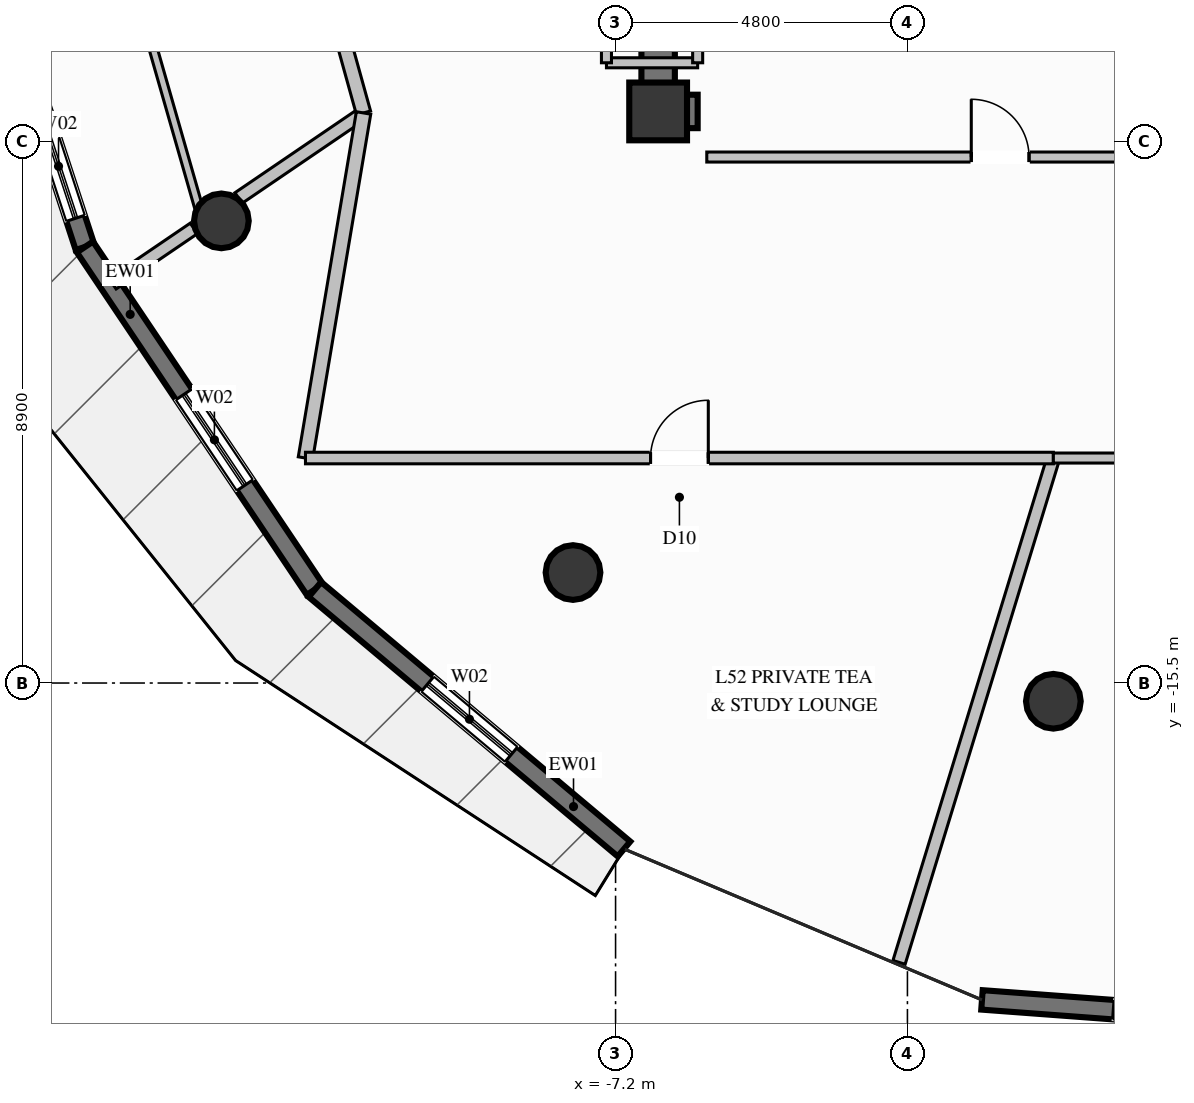
"""IFC4 building model, lengths in metres.
Left out: names, types, materials, properties, quantities, classifications, styles, units other than length and angle.
Written with IfcOpenShell. Run it as: python <this file> out.ifc"""

import sys

from ifc_helpers import new_model, si_unit, direction, frame, frame_2d, origin, origin_2d, place, context, subcontext, project, spatial, rectangle, circle, extrude, element, fill, save


model = new_model("IFC4")
c1 = context("Model", 3, precision=1e-05, world=origin(), true_north=direction((0.0, 1.0)))
c2 = subcontext(c1, "Body", "Model", "MODEL_VIEW")
j1 = project(units=[si_unit("LENGTHUNIT", "METRE"), si_unit("PLANEANGLEUNIT", "RADIAN")], contexts=[c1])
p1 = place(None, origin())
s1 = spatial("IfcSite", under=j1, at=p1, CompositionType="ELEMENT")
p2 = place(p1, origin())
s2 = spatial("IfcBuilding", under=s1, at=p2, CompositionType="ELEMENT")
p3 = place(p2, frame((0.0, 0.0, 202.0)))
s3 = spatial("IfcBuildingStorey", under=s2, at=p3, CompositionType="ELEMENT", Elevation=202.0)
p4 = place(p3, frame((-6.5, -6.1, 0.0), z_axis=(0.0, 0.0, 1.0), x_axis=(1.0, 0.0, 0.0)))
e1 = element("IfcColumn", 1, at=p4, inside=s3, PredefinedType="COLUMN", context=c2, shape_type="SweptSolid", body=[
    extrude(rectangle(XDim=0.95, YDim=0.95, at=origin_2d()), origin(), (0.0, 0.0, 1.0), 3.6),
])
p5 = place(p3, frame((-6.225, -6.1, 0.0), z_axis=(0.0, 0.0, 1.0), x_axis=(1.0, 0.0, 0.0)))
e2 = element("IfcWall", 2, at=p5, inside=s3, PredefinedType="SHEAR", context=c2, shape_type="SweptSolid", body=[
    extrude(rectangle(XDim=0.375, YDim=0.55, at=frame_2d((0.188, 0.0))), origin(), (0.0, 0.0, 1.0), 3.6),
])
p6 = place(p3, frame((-6.5, -6.375, 0.0), z_axis=(0.0, 0.0, 1.0), x_axis=(0.0, 1.0, 0.0)))
e3 = element("IfcWall", 3, at=p6, inside=s3, PredefinedType="SHEAR", context=c2, shape_type="SweptSolid", body=[
    extrude(rectangle(XDim=3.025, YDim=0.55, at=frame_2d((1.512, 0.0))), origin(), (0.0, 0.0, 1.0), 3.6),
])
for number, where, z_axis, x_axis in (
    (4, (-13.683, -7.9, 0.0), (0.0, 0.0, 1.0), (1.0, 0.0, 0.0)),
    (5, (-7.9, -13.683, 0.0), (0.0, 0.0, 1.0), (1.0, 0.0, 0.0)),
    (6, (0.0, -15.8, 0.0), (0.0, 0.0, 1.0), (1.0, 0.0, 0.0)),
):
    element("IfcColumn", number, at=place(p3, frame(where, z_axis=z_axis, x_axis=x_axis)), inside=s3, PredefinedType="COLUMN", context=c2, shape_type="SweptSolid", body=[
        extrude(circle(Radius=0.45, at=origin_2d()), origin(), (0.0, 0.0, 1.0), 3.6),
    ])
p7 = place(p3, frame((-15.927, -8.329, 0.0), z_axis=(0.0, 0.0, 1.0), x_axis=(-0.311096372271, 0.950378370524, 0.0)))
e7 = element("IfcWall", 7, at=p7, inside=s3, PredefinedType="SOLIDWALL", context=c2, shape_type="SweptSolid", body=[
    extrude(rectangle(XDim=6.786, YDim=0.32, at=frame_2d((3.393, 0.0))), origin(), (0.0, 0.0, 1.0), 3.36),
])
p8 = place(p7, frame((0.496, 0.0, 0.35)))
e8 = element("IfcOpeningElement", 8, at=p8, cuts=e7, PredefinedType="OPENING", context=c2, shape_type="SweptSolid", body=[
    extrude(rectangle(XDim=1.8, YDim=2.6, at=frame_2d((0.9, 1.3))), frame((0.0, 0.17, 0.0), z_axis=(0.0, -1.0, 0.0), x_axis=(1.0, 0.0, 0.0)), (0.0, 0.0, 1.0), 0.34),
])
p9 = place(p7, frame((2.843, 0.0, 0.0)))
e9 = element("IfcOpeningElement", 9, at=p9, cuts=e7, PredefinedType="OPENING", context=c2, shape_type="SweptSolid", body=[
    extrude(rectangle(XDim=1.1, YDim=2.2, at=frame_2d((0.55, 1.1))), frame((0.0, 0.17, 0.0), z_axis=(0.0, -1.0, 0.0), x_axis=(1.0, 0.0, 0.0)), (0.0, 0.0, 1.0), 0.34),
])
p10 = place(p3, frame((-12.145, -13.962, 0.0), z_axis=(0.0, 0.0, 1.0), x_axis=(-0.557429227347, 0.830224461516, 0.0)))
e10 = element("IfcWall", 10, at=p10, inside=s3, PredefinedType="SOLIDWALL", context=c2, shape_type="SweptSolid", body=[
    extrude(rectangle(XDim=6.785, YDim=0.32, at=frame_2d((3.392, 0.0))), origin(), (0.0, 0.0, 1.0), 3.36),
])
p11 = place(p10, frame((2.065, 0.0, 0.35)))
e11 = element("IfcOpeningElement", 11, at=p11, cuts=e10, PredefinedType="OPENING", context=c2, shape_type="SweptSolid", body=[
    extrude(rectangle(XDim=1.8, YDim=2.6, at=frame_2d((0.9, 1.3))), frame((0.0, 0.17, 0.0), z_axis=(0.0, -1.0, 0.0), x_axis=(1.0, 0.0, 0.0)), (0.0, 0.0, 1.0), 0.34),
])
p12 = place(p3, frame((-7.061, -18.229, 0.0), z_axis=(0.0, 0.0, 1.0), x_axis=(-0.765961316102, 0.642886663601, 0.0)))
e12 = element("IfcWall", 12, at=p12, inside=s3, PredefinedType="SOLIDWALL", context=c2, shape_type="SweptSolid", body=[
    extrude(rectangle(XDim=6.637, YDim=0.32, at=frame_2d((3.319, 0.0))), origin(), (0.0, 0.0, 1.0), 3.36),
])
p13 = place(p12, frame((2.419, 0.0, 0.35)))
e13 = element("IfcOpeningElement", 13, at=p13, cuts=e12, PredefinedType="OPENING", context=c2, shape_type="SweptSolid", body=[
    extrude(rectangle(XDim=1.8, YDim=2.6, at=frame_2d((0.9, 1.3))), frame((0.0, 0.17, 0.0), z_axis=(0.0, -1.0, 0.0), x_axis=(1.0, 0.0, 0.0)), (0.0, 0.0, 1.0), 0.34),
])
p14 = place(p3, frame((4.941, -21.166, 0.0), z_axis=(0.0, 0.0, 1.0), x_axis=(-0.997242274748, 0.074214860068, 0.0)))
e14 = element("IfcWall", 14, at=p14, inside=s3, PredefinedType="SOLIDWALL", context=c2, shape_type="SweptSolid", body=[
    extrude(rectangle(XDim=6.132, YDim=0.32, at=frame_2d((3.066, 0.0))), origin(), (0.0, 0.0, 1.0), 3.36),
])
p15 = place(p14, frame((2.166, 0.0, 0.35)))
e15 = element("IfcOpeningElement", 15, at=p15, cuts=e14, PredefinedType="OPENING", context=c2, shape_type="SweptSolid", body=[
    extrude(rectangle(XDim=1.8, YDim=2.6, at=frame_2d((0.9, 1.3))), frame((0.0, 0.17, 0.0), z_axis=(0.0, -1.0, 0.0), x_axis=(1.0, 0.0, 0.0)), (0.0, 0.0, 1.0), 0.34),
])
p16 = place(p3, frame((-7.35, -5.3, 0.0), z_axis=(0.0, 0.0, 1.0), x_axis=(1.0, 0.0, 0.0)))
e16 = element("IfcWall", 16, at=p16, inside=s3, PredefinedType="PARTITIONING", context=c2, shape_type="SweptSolid", body=[
    extrude(rectangle(XDim=1.5, YDim=0.165, at=frame_2d((0.75, 0.0))), origin(), (0.0, 0.0, 1.0), 2.445),
])
p17 = place(p3, frame((-5.85, -5.3, 0.0), z_axis=(0.0, 0.0, 1.0), x_axis=(0.0, 1.0, 0.0)))
e17 = element("IfcWall", 17, at=p17, inside=s3, PredefinedType="PARTITIONING", context=c2, shape_type="SweptSolid", body=[
    extrude(rectangle(XDim=2.5, YDim=0.165, at=frame_2d((1.25, 0.0))), origin(), (0.0, 0.0, 1.0), 2.445),
])
p18 = place(p3, frame((-7.35, -2.8, 0.0), z_axis=(0.0, 0.0, 1.0), x_axis=(0.0, -1.0, 0.0)))
e18 = element("IfcWall", 18, at=p18, inside=s3, PredefinedType="PARTITIONING", context=c2, shape_type="SweptSolid", body=[
    extrude(rectangle(XDim=2.5, YDim=0.165, at=frame_2d((1.25, 0.0))), origin(), (0.0, 0.0, 1.0), 3.36),
])
p19 = place(p18, frame((0.775, 0.0, 0.0)))
e19 = element("IfcOpeningElement", 19, at=p19, cuts=e18, PredefinedType="OPENING", context=c2, shape_type="SweptSolid", body=[
    extrude(rectangle(XDim=0.95, YDim=2.1, at=frame_2d((0.475, 1.05))), frame((0.0, 0.093, 0.0), z_axis=(0.0, -1.0, 0.0), x_axis=(1.0, 0.0, 0.0)), (0.0, 0.0, 1.0), 0.185),
])
p20 = place(p3, frame((-5.7, -6.85, 0.0), z_axis=(0.0, 0.0, 1.0), x_axis=(1.0, 0.0, 0.0)))
e20 = element("IfcWall", 20, at=p20, inside=s3, PredefinedType="PARTITIONING", context=c2, shape_type="SweptSolid", body=[
    extrude(rectangle(XDim=9.65, YDim=0.165, at=frame_2d((4.825, 0.0))), origin(), (0.0, 0.0, 1.0), 2.445),
])
p21 = place(p20, frame((4.35, 0.0, 0.0)))
e21 = element("IfcOpeningElement", 21, at=p21, cuts=e20, PredefinedType="OPENING", context=c2, shape_type="SweptSolid", body=[
    extrude(rectangle(XDim=0.95, YDim=2.1, at=frame_2d((0.475, 1.05))), frame((0.0, 0.093, 0.0), z_axis=(0.0, -1.0, 0.0), x_axis=(1.0, 0.0, 0.0)), (0.0, 0.0, 1.0), 0.185),
])
p22 = place(p3, frame((-11.345, -6.125, 0.0), z_axis=(0.0, 0.0, 1.0), x_axis=(-0.82675664011, -0.562559737303, 0.0)))
e22 = element("IfcWall", 22, at=p22, inside=s3, PredefinedType="PARTITIONING", context=c2, shape_type="SweptSolid", body=[
    extrude(rectangle(XDim=2.487, YDim=0.21, at=frame_2d((1.243, 0.0))), origin(), (0.0, 0.0, 1.0), 2.801),
])
p23 = place(p3, frame((-14.136, -8.024, 0.0), z_axis=(0.0, 0.0, 1.0), x_axis=(-0.826904032376, -0.562343063654, 0.0)))
e23 = element("IfcWall", 23, at=p23, inside=s3, PredefinedType="PARTITIONING", context=c2, shape_type="SweptSolid", body=[
    extrude(rectangle(XDim=1.617, YDim=0.21, at=frame_2d((0.808, 0.0))), origin(), (0.0, 0.0, 1.0), 3.36),
])
p24 = place(p3, frame((-13.1, 0.2, 0.0), z_axis=(0.0, 0.0, 1.0), x_axis=(0.26738871748, -0.963588747218, 0.0)))
e24 = element("IfcWall", 24, at=p24, inside=s3, PredefinedType="PARTITIONING", context=c2, shape_type="SweptSolid", body=[
    extrude(rectangle(XDim=6.564, YDim=0.24, at=frame_2d((3.282, 0.0))), origin(), (0.0, 0.0, 1.0), 3.36),
])
p25 = place(p3, frame((-16.277, 0.072, 0.0), z_axis=(0.0, 0.0, 1.0), x_axis=(0.275388011089, -0.961333159393, 0.0)))
e25 = element("IfcWall", 25, at=p25, inside=s3, PredefinedType="PARTITIONING", context=c2, shape_type="SweptSolid", body=[
    extrude(rectangle(XDim=8.316, YDim=0.135, at=frame_2d((4.158, 0.0))), origin(), (0.0, 0.0, 1.0), 2.929),
])
p26 = place(p25, frame((3.683, 0.0, 0.0)))
e26 = element("IfcOpeningElement", 26, at=p26, cuts=e25, PredefinedType="OPENING", context=c2, shape_type="SweptSolid", body=[
    extrude(rectangle(XDim=0.95, YDim=2.1, at=frame_2d((0.475, 1.05))), frame((0.0, 0.078, 0.0), z_axis=(0.0, -1.0, 0.0), x_axis=(1.0, 0.0, 0.0)), (0.0, 0.0, 1.0), 0.155),
])
p27 = place(p3, frame((0.0, -11.8, 0.0), z_axis=(0.0, 0.0, 1.0), x_axis=(-0.292621831888, -0.956228248643, 0.0)))
e27 = element("IfcWall", 27, at=p27, inside=s3, PredefinedType="PARTITIONING", context=c2, shape_type="SweptSolid", body=[
    extrude(rectangle(XDim=8.674, YDim=0.21, at=frame_2d((4.337, 0.0))), origin(), (0.0, 0.0, 1.0), 3.36),
])
p28 = place(p3, frame((-11.345, -6.125, 0.0), z_axis=(0.0, 0.0, 1.0), x_axis=(-0.165960421789, -0.986132414232, 0.0)))
e28 = element("IfcWall", 28, at=p28, inside=s3, PredefinedType="PARTITIONING", context=c2, shape_type="SweptSolid", body=[
    extrude(rectangle(XDim=5.755, YDim=0.24, at=frame_2d((2.877, 0.0))), origin(), (0.0, 0.0, 1.0), 3.36),
])
p29 = place(p3, frame((-12.3, -11.8, 0.0), z_axis=(0.0, 0.0, 1.0), x_axis=(1.0, 0.0, 0.0)))
e29 = element("IfcWall", 29, at=p29, inside=s3, PredefinedType="PARTITIONING", context=c2, shape_type="SweptSolid", body=[
    extrude(rectangle(XDim=12.3, YDim=0.19, at=frame_2d((6.15, 0.0))), origin(), (0.0, 0.0, 1.0), 3.36),
])
p30 = place(p29, frame((5.675, 0.0, 0.0)))
e30 = element("IfcOpeningElement", 30, at=p30, cuts=e29, PredefinedType="OPENING", context=c2, shape_type="SweptSolid", body=[
    extrude(rectangle(XDim=0.95, YDim=2.1, at=frame_2d((0.475, 1.05))), frame((0.0, 0.105, 0.0), z_axis=(0.0, -1.0, 0.0), x_axis=(1.0, 0.0, 0.0)), (0.0, 0.0, 1.0), 0.21),
])
p31 = place(p3, frame((0.0, -11.8, 0.0), z_axis=(0.0, 0.0, 1.0), x_axis=(1.0, 0.0, 0.0)))
e31 = element("IfcWall", 31, at=p31, inside=s3, PredefinedType="PARTITIONING", context=c2, shape_type="SweptSolid", body=[
    extrude(rectangle(XDim=12.3, YDim=0.165, at=frame_2d((6.15, 0.0))), origin(), (0.0, 0.0, 1.0), 3.36),
])
p32 = place(p31, frame((5.675, 0.0, 0.0)))
e32 = element("IfcOpeningElement", 32, at=p32, cuts=e31, PredefinedType="OPENING", context=c2, shape_type="SweptSolid", body=[
    extrude(rectangle(XDim=0.95, YDim=2.1, at=frame_2d((0.475, 1.05))), frame((0.0, 0.093, 0.0), z_axis=(0.0, -1.0, 0.0), x_axis=(1.0, 0.0, 0.0)), (0.0, 0.0, 1.0), 0.185),
])
p33 = place(p8, origin())
e33 = element("IfcWindow", 33, at=p33, inside=s3, PartitioningType="SINGLE_PANEL", PredefinedType="WINDOW", context=c2, shape_type="SweptSolid", body=[
    extrude(rectangle(XDim=1.8, YDim=2.6, at=frame_2d((0.9, 1.3))), frame((0.0, 0.03, 0.0), z_axis=(0.0, -1.0, 0.0), x_axis=(1.0, 0.0, 0.0)), (0.0, 0.0, 1.0), 0.06),
])
fill(e8, e33)
p34 = place(p11, origin())
e34 = element("IfcWindow", 34, at=p34, inside=s3, PartitioningType="SINGLE_PANEL", PredefinedType="WINDOW", context=c2, shape_type="SweptSolid", body=[
    extrude(rectangle(XDim=1.8, YDim=2.6, at=frame_2d((0.9, 1.3))), frame((0.0, 0.03, 0.0), z_axis=(0.0, -1.0, 0.0), x_axis=(1.0, 0.0, 0.0)), (0.0, 0.0, 1.0), 0.06),
])
fill(e11, e34)
p35 = place(p13, origin())
e35 = element("IfcWindow", 35, at=p35, inside=s3, PartitioningType="SINGLE_PANEL", PredefinedType="WINDOW", context=c2, shape_type="SweptSolid", body=[
    extrude(rectangle(XDim=1.8, YDim=2.6, at=frame_2d((0.9, 1.3))), frame((0.0, 0.03, 0.0), z_axis=(0.0, -1.0, 0.0), x_axis=(1.0, 0.0, 0.0)), (0.0, 0.0, 1.0), 0.06),
])
fill(e13, e35)
p36 = place(p15, origin())
e36 = element("IfcWindow", 36, at=p36, inside=s3, PartitioningType="SINGLE_PANEL", PredefinedType="WINDOW", context=c2, shape_type="SweptSolid", body=[
    extrude(rectangle(XDim=1.8, YDim=2.6, at=frame_2d((0.9, 1.3))), frame((0.0, 0.03, 0.0), z_axis=(0.0, -1.0, 0.0), x_axis=(1.0, 0.0, 0.0)), (0.0, 0.0, 1.0), 0.06),
])
fill(e15, e36)
p37 = place(p21, origin())
e37 = element("IfcDoor", 37, at=p37, inside=s3, OperationType="SINGLE_SWING_LEFT", PredefinedType="DOOR", context=c2, shape_type="SweptSolid", body=[
    extrude(rectangle(XDim=0.95, YDim=2.1, at=frame_2d((0.475, 1.05))), frame((0.0, 0.025, 0.0), z_axis=(0.0, -1.0, 0.0), x_axis=(1.0, 0.0, 0.0)), (0.0, 0.0, 1.0), 0.05),
])
fill(e21, e37)
p38 = place(p30, origin())
e38 = element("IfcDoor", 38, at=p38, inside=s3, OperationType="SINGLE_SWING_RIGHT", PredefinedType="DOOR", context=c2, shape_type="SweptSolid", body=[
    extrude(rectangle(XDim=0.95, YDim=2.1, at=frame_2d((0.475, 1.05))), frame((0.0, 0.025, 0.0), z_axis=(0.0, -1.0, 0.0), x_axis=(1.0, 0.0, 0.0)), (0.0, 0.0, 1.0), 0.05),
])
fill(e30, e38)
save(model, sys.argv[1])
